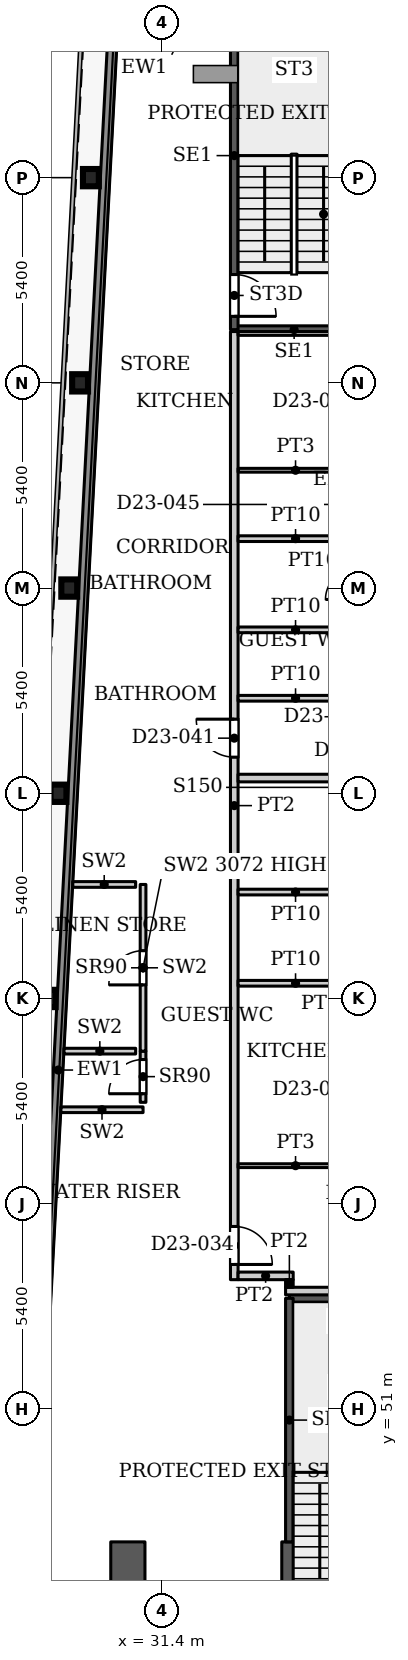
"""IFC4 building model, lengths in metres.
Left out: names, types, materials, properties, quantities, classifications, styles, units other than length and angle.
Written with IfcOpenShell. Run it as: python <this file> out.ifc"""

import sys

from ifc_helpers import new_model, si_unit, direction, frame, frame_2d, origin, origin_2d, place, context, subcontext, project, spatial, rectangle, i_section, extrude, source, transform, mapped, element, fill, save


model = new_model("IFC4")
c1 = context("Model", 3, precision=1e-05, world=origin(), true_north=direction((0.0, 1.0)))
c2 = subcontext(c1, "Body", "Model", "MODEL_VIEW")
j1 = project(units=[si_unit("LENGTHUNIT", "METRE"), si_unit("PLANEANGLEUNIT", "RADIAN")], contexts=[c1])
p1 = place(None, origin())
s1 = spatial("IfcSite", under=j1, at=p1, CompositionType="ELEMENT")
p2 = place(p1, origin())
s2 = spatial("IfcBuilding", under=s1, at=p2, CompositionType="ELEMENT")
p3 = place(p2, frame((0.0, 0.0, 101.9)))
s3 = spatial("IfcBuildingStorey", under=s2, at=p3, CompositionType="ELEMENT", Elevation=101.9)
for number, where, z_axis, x_axis in (
    (1, (28.39, 61.8, 0.0), (0.0, 0.0, 1.0), (1.0, 0.0, 0.0)),
    (2, (28.674, 67.2, 0.0), (0.0, 0.0, 1.0), (1.0, 0.0, 0.0)),
    (3, (28.958, 72.6, 0.0), (0.0, 0.0, 1.0), (1.0, 0.0, 0.0)),
    (4, (29.243, 78.0, 0.0), (0.0, 0.0, 1.0), (1.0, 0.0, 0.0)),
    (5, (29.527, 83.4, 0.0), (0.0, 0.0, 1.0), (1.0, 0.0, 0.0)),
):
    element("IfcColumn", number, at=place(p3, frame(where, z_axis=z_axis, x_axis=x_axis)), inside=s3, PredefinedType="COLUMN", context=c2, shape_type="SweptSolid", body=[
        extrude(i_section(OverallWidth=0.418, OverallDepth=0.455, WebThickness=0.042, FlangeThickness=0.068, FilletRadius=0.014, at=origin_2d()), origin(), (0.0, 0.0, 1.0), 3.9),
    ])
p4 = place(p3, frame((34.75, 29.05, 0.0), z_axis=(0.0, 0.0, 1.0), x_axis=(0.0, 1.0, 0.0)))
e6 = element("IfcWall", 6, at=p4, inside=s3, PredefinedType="SHEAR", context=c2, shape_type="SweptSolid", body=[
    extrude(rectangle(XDim=18.45, YDim=0.4, at=frame_2d((9.225, 0.0))), origin(), (0.0, 0.0, 1.0), 3.9),
])
p5 = place(p4, frame((8.025, 0.0, 0.0)))
e7 = element("IfcOpeningElement", 7, at=p5, cuts=e6, PredefinedType="OPENING", context=c2, shape_type="SweptSolid", body=[
    extrude(rectangle(XDim=1.1, YDim=2.2, at=frame_2d((0.55, 1.1))), frame((0.0, 0.21, 0.0), z_axis=(0.0, -1.0, 0.0), x_axis=(1.0, 0.0, 0.0)), (0.0, 0.0, 1.0), 0.42),
])
p6 = place(p4, frame((10.875, 0.0, 0.0)))
e8 = element("IfcOpeningElement", 8, at=p6, cuts=e6, PredefinedType="OPENING", context=c2, shape_type="SweptSolid", body=[
    extrude(rectangle(XDim=1.1, YDim=2.2, at=frame_2d((0.55, 1.1))), frame((0.0, 0.21, 0.0), z_axis=(0.0, -1.0, 0.0), x_axis=(1.0, 0.0, 0.0)), (0.0, 0.0, 1.0), 0.42),
])
p7 = place(p4, frame((13.725, 0.0, 0.0)))
e9 = element("IfcOpeningElement", 9, at=p7, cuts=e6, PredefinedType="OPENING", context=c2, shape_type="SweptSolid", body=[
    extrude(rectangle(XDim=1.1, YDim=2.2, at=frame_2d((0.55, 1.1))), frame((0.0, 0.21, 0.0), z_axis=(0.0, -1.0, 0.0), x_axis=(1.0, 0.0, 0.0)), (0.0, 0.0, 1.0), 0.42),
])
p8 = place(p4, frame((15.95, 0.0, 0.0)))
e10 = element("IfcOpeningElement", 10, at=p8, cuts=e6, PredefinedType="OPENING", context=c2, shape_type="SweptSolid", body=[
    extrude(rectangle(XDim=1.1, YDim=2.2, at=frame_2d((0.55, 1.1))), frame((0.0, 0.21, 0.0), z_axis=(0.0, -1.0, 0.0), x_axis=(1.0, 0.0, 0.0)), (0.0, 0.0, 1.0), 0.42),
])
p9 = place(p3, frame((30.5, 29.05, 0.0), z_axis=(0.0, 0.0, 1.0), x_axis=(0.0, 1.0, 0.0)))
e11 = element("IfcWall", 11, at=p9, inside=s3, PredefinedType="SHEAR", context=c2, shape_type="SweptSolid", body=[
    extrude(rectangle(XDim=18.45, YDim=0.9, at=frame_2d((9.225, 0.0))), origin(), (0.0, 0.0, 1.0), 3.9),
])
p10 = place(p9, frame((1.5, 0.0, 0.0)))
e12 = element("IfcOpeningElement", 12, at=p10, cuts=e11, PredefinedType="OPENING", context=c2, shape_type="SweptSolid", body=[
    extrude(rectangle(XDim=0.9, YDim=2.2, at=frame_2d((0.45, 1.1))), frame((0.0, 0.46, 0.0), z_axis=(0.0, -1.0, 0.0), x_axis=(1.0, 0.0, 0.0)), (0.0, 0.0, 1.0), 0.92),
])
p11 = place(p9, frame((6.03, 0.0, 0.0)))
e13 = element("IfcOpeningElement", 13, at=p11, cuts=e11, PredefinedType="OPENING", context=c2, shape_type="SweptSolid", body=[
    extrude(rectangle(XDim=0.9, YDim=2.2, at=frame_2d((0.45, 1.1))), frame((0.0, 0.46, 0.0), z_axis=(0.0, -1.0, 0.0), x_axis=(1.0, 0.0, 0.0)), (0.0, 0.0, 1.0), 0.92),
])
p12 = place(p9, frame((9.7, 0.0, 0.0)))
e14 = element("IfcOpeningElement", 14, at=p12, cuts=e11, PredefinedType="OPENING", context=c2, shape_type="SweptSolid", body=[
    extrude(rectangle(XDim=0.9, YDim=2.2, at=frame_2d((0.45, 1.1))), frame((0.0, 0.46, 0.0), z_axis=(0.0, -1.0, 0.0), x_axis=(1.0, 0.0, 0.0)), (0.0, 0.0, 1.0), 0.92),
])
p13 = place(p3, frame((27.195, 31.969, 0.0), z_axis=(0.0, 0.0, 1.0), x_axis=(0.052559748861, 0.998617781135, 0.0)))
e15 = element("IfcWall", 15, at=p13, inside=s3, PredefinedType="SOLIDWALL", context=c2, shape_type="SweptSolid", body=[
    extrude(rectangle(XDim=55.972, YDim=0.25, at=frame_2d((27.986, 0.0))), origin(), (0.0, 0.0, 1.0), 3.75),
])
p14 = place(p3, frame((34.75, 53.91, 0.0), z_axis=(0.0, 0.0, 1.0), x_axis=(1.0, 0.0, 0.0)))
e16 = element("IfcWall", 16, at=p14, inside=s3, PredefinedType="SHEAR", context=c2, shape_type="SweptSolid", body=[
    extrude(rectangle(XDim=3.15, YDim=0.2, at=frame_2d((1.575, 0.0))), origin(), (0.0, 0.0, 1.0), 3.9),
])
p15 = place(p3, frame((34.75, 47.5, 0.0), z_axis=(0.0, 0.0, 1.0), x_axis=(0.0, 1.0, 0.0)))
e17 = element("IfcWall", 17, at=p15, inside=s3, PredefinedType="SHEAR", context=c2, shape_type="SweptSolid", body=[
    extrude(rectangle(XDim=6.41, YDim=0.2, at=frame_2d((3.205, 0.0))), origin(), (0.0, 0.0, 1.0), 3.9),
])
p16 = place(p3, frame((33.3, 79.4, 0.0), z_axis=(0.0, 0.0, 1.0), x_axis=(1.0, 0.0, 0.0)))
e18 = element("IfcWall", 18, at=p16, inside=s3, PredefinedType="SHEAR", context=c2, shape_type="SweptSolid", body=[
    extrude(rectangle(XDim=3.15, YDim=0.2, at=frame_2d((1.575, 0.0))), origin(), (0.0, 0.0, 1.0), 3.9),
])
p17 = place(p3, frame((33.3, 79.4, 0.0), z_axis=(0.0, 0.0, 1.0), x_axis=(0.0, 1.0, 0.0)))
e19 = element("IfcWall", 19, at=p17, inside=s3, PredefinedType="SHEAR", context=c2, shape_type="SweptSolid", body=[
    extrude(rectangle(XDim=9.16, YDim=0.2, at=frame_2d((4.58, 0.0))), origin(), (0.0, 0.0, 1.0), 3.9),
])
p18 = place(p17, frame((0.35, 0.0, 0.0)))
e20 = element("IfcOpeningElement", 20, at=p18, cuts=e19, PredefinedType="OPENING", context=c2, shape_type="SweptSolid", body=[
    extrude(rectangle(XDim=1.1, YDim=2.2, at=frame_2d((0.55, 1.1))), frame((0.0, 0.11, 0.0), z_axis=(0.0, -1.0, 0.0), x_axis=(1.0, 0.0, 0.0)), (0.0, 0.0, 1.0), 0.22),
])
p19 = place(p3, frame((28.739, 58.872, 0.0), z_axis=(0.0, 0.0, 1.0), x_axis=(1.0, 0.0, 0.0)))
e21 = element("IfcWall", 21, at=p19, inside=s3, PredefinedType="PARTITIONING", context=c2, shape_type="SweptSolid", body=[
    extrude(rectangle(XDim=2.161, YDim=0.15, at=frame_2d((1.081, 0.0))), origin(), (0.0, 0.0, 1.0), 3.9),
])
p20 = place(p3, frame((30.9, 59.067, 0.0), z_axis=(0.0, 0.0, 1.0), x_axis=(0.0, 1.0, 0.0)))
e22 = element("IfcWall", 22, at=p20, inside=s3, PredefinedType="PARTITIONING", context=c2, shape_type="SweptSolid", body=[
    extrude(rectangle(XDim=1.347, YDim=0.15, at=frame_2d((0.674, 0.0))), origin(), (0.0, 0.0, 1.0), 3.9),
])
p21 = place(p20, frame((0.226, 0.0, 0.0)))
e23 = element("IfcOpeningElement", 23, at=p21, cuts=e22, PredefinedType="OPENING", context=c2, shape_type="SweptSolid", body=[
    extrude(rectangle(XDim=0.9, YDim=2.2, at=frame_2d((0.45, 1.1))), frame((0.0, 0.085, 0.0), z_axis=(0.0, -1.0, 0.0), x_axis=(1.0, 0.0, 0.0)), (0.0, 0.0, 1.0), 0.17),
])
p22 = place(p3, frame((28.82, 60.414, 0.0), z_axis=(0.0, 0.0, 1.0), x_axis=(1.0, 0.0, 0.0)))
e24 = element("IfcWall", 24, at=p22, inside=s3, PredefinedType="PARTITIONING", context=c2, shape_type="SweptSolid", body=[
    extrude(rectangle(XDim=1.885, YDim=0.15, at=frame_2d((0.942, 0.0))), origin(), (0.0, 0.0, 1.0), 3.9),
])
p23 = place(p3, frame((30.9, 60.414, 0.0), z_axis=(0.0, 0.0, 1.0), x_axis=(0.0, 1.0, 0.0)))
e25 = element("IfcWall", 25, at=p23, inside=s3, PredefinedType="PARTITIONING", context=c2, shape_type="SweptSolid", body=[
    extrude(rectangle(XDim=4.386, YDim=0.15, at=frame_2d((2.193, 0.0))), origin(), (0.0, 0.0, 1.0), 3.072),
])
p24 = place(p23, frame((1.743, 0.0, 0.0)))
e26 = element("IfcOpeningElement", 26, at=p24, cuts=e25, PredefinedType="OPENING", context=c2, shape_type="SweptSolid", body=[
    extrude(rectangle(XDim=0.9, YDim=2.2, at=frame_2d((0.45, 1.1))), frame((0.0, 0.085, 0.0), z_axis=(0.0, -1.0, 0.0), x_axis=(1.0, 0.0, 0.0)), (0.0, 0.0, 1.0), 0.17),
])
p25 = place(p3, frame((29.051, 64.8, 0.0), z_axis=(0.0, 0.0, 1.0), x_axis=(1.0, 0.0, 0.0)))
e27 = element("IfcWall", 27, at=p25, inside=s3, PredefinedType="PARTITIONING", context=c2, shape_type="SweptSolid", body=[
    extrude(rectangle(XDim=1.654, YDim=0.15, at=frame_2d((0.827, 0.0))), origin(), (0.0, 0.0, 1.0), 3.9),
])
p26 = place(p3, frame((33.3, 54.4, 0.0), z_axis=(0.0, 0.0, 1.0), x_axis=(0.0, 1.0, 0.0)))
e28 = element("IfcWall", 28, at=p26, inside=s3, PredefinedType="PARTITIONING", context=c2, shape_type="SweptSolid", body=[
    extrude(rectangle(XDim=24.95, YDim=0.2, at=frame_2d((12.475, 0.0))), origin(), (0.0, 0.0, 1.0), 3.6),
])
p27 = place(p26, frame((0.4, 0.0, 0.0)))
e29 = element("IfcOpeningElement", 29, at=p27, cuts=e28, PredefinedType="OPENING", context=c2, shape_type="SweptSolid", body=[
    extrude(rectangle(XDim=1.0, YDim=2.1, at=frame_2d((0.5, 1.05))), frame((0.0, 0.11, 0.0), z_axis=(0.0, -1.0, 0.0), x_axis=(1.0, 0.0, 0.0)), (0.0, 0.0, 1.0), 0.22),
])
p28 = place(p26, frame((13.75, 0.0, 0.0)))
e30 = element("IfcOpeningElement", 30, at=p28, cuts=e28, PredefinedType="OPENING", context=c2, shape_type="SweptSolid", body=[
    extrude(rectangle(XDim=1.0, YDim=2.1, at=frame_2d((0.5, 1.05))), frame((0.0, 0.11, 0.0), z_axis=(0.0, -1.0, 0.0), x_axis=(1.0, 0.0, 0.0)), (0.0, 0.0, 1.0), 0.22),
])
p29 = place(p3, frame((33.4, 54.5, 0.0), z_axis=(0.0, 0.0, 1.0), x_axis=(1.0, 0.0, 0.0)))
e31 = element("IfcWall", 31, at=p29, inside=s3, PredefinedType="PARTITIONING", context=c2, shape_type="SweptSolid", body=[
    extrude(rectangle(XDim=1.45, YDim=0.2, at=frame_2d((0.725, 0.0))), origin(), (0.0, 0.0, 1.0), 3.6),
])
p30 = place(p3, frame((33.4, 57.4, 0.0), z_axis=(0.0, 0.0, 1.0), x_axis=(1.0, 0.0, 0.0)))
e32 = element("IfcWall", 32, at=p30, inside=s3, PredefinedType="PARTITIONING", context=c2, shape_type="SweptSolid", body=[
    extrude(rectangle(XDim=3.025, YDim=0.1, at=frame_2d((1.513, 0.0))), origin(), (0.0, 0.0, 1.0), 3.6),
])
for number, where, z_axis, x_axis in (
    (33, (33.4, 62.2, 0.0), (0.0, 0.0, 1.0), (1.0, 0.0, 0.0)),
    (34, (33.4, 64.6, 0.0), (0.0, 0.0, 1.0), (1.0, 0.0, 0.0)),
):
    element("IfcWall", number, at=place(p3, frame(where, z_axis=z_axis, x_axis=x_axis)), inside=s3, PredefinedType="PARTITIONING", context=c2, shape_type="SweptSolid", body=[
        extrude(rectangle(XDim=3.025, YDim=0.15, at=frame_2d((1.513, 0.0))), origin(), (0.0, 0.0, 1.0), 3.6),
    ])
p31 = place(p3, frame((33.4, 67.6, 0.0), z_axis=(0.0, 0.0, 1.0), x_axis=(1.0, 0.0, 0.0)))
e35 = element("IfcWall", 35, at=p31, inside=s3, PredefinedType="PARTITIONING", context=c2, shape_type="SweptSolid", body=[
    extrude(rectangle(XDim=12.5, YDim=0.2, at=frame_2d((6.25, 0.0))), origin(), (0.0, 0.0, 1.0), 3.6),
])
for number, where, z_axis, x_axis in (
    (36, (33.4, 69.7, 0.0), (0.0, 0.0, 1.0), (1.0, 0.0, 0.0)),
    (37, (33.4, 71.5, 0.0), (0.0, 0.0, 1.0), (1.0, 0.0, 0.0)),
    (38, (33.4, 73.9, 0.0), (0.0, 0.0, 1.0), (1.0, 0.0, 0.0)),
):
    element("IfcWall", number, at=place(p3, frame(where, z_axis=z_axis, x_axis=x_axis)), inside=s3, PredefinedType="PARTITIONING", context=c2, shape_type="SweptSolid", body=[
        extrude(rectangle(XDim=3.025, YDim=0.15, at=frame_2d((1.513, 0.0))), origin(), (0.0, 0.0, 1.0), 3.6),
    ])
p32 = place(p3, frame((33.4, 75.7, 0.0), z_axis=(0.0, 0.0, 1.0), x_axis=(1.0, 0.0, 0.0)))
e39 = element("IfcWall", 39, at=p32, inside=s3, PredefinedType="PARTITIONING", context=c2, shape_type="SweptSolid", body=[
    extrude(rectangle(XDim=3.025, YDim=0.1, at=frame_2d((1.513, 0.0))), origin(), (0.0, 0.0, 1.0), 3.6),
])
p33 = place(p3, frame((33.4, 79.3, 0.0), z_axis=(0.0, 0.0, 1.0), x_axis=(1.0, 0.0, 0.0)))
e40 = element("IfcWall", 40, at=p33, inside=s3, PredefinedType="PARTITIONING", context=c2, shape_type="SweptSolid", body=[
    extrude(rectangle(XDim=12.5, YDim=0.1, at=frame_2d((6.25, 0.0))), origin(), (0.0, 0.0, 1.0), 3.6),
])
p34 = place(p33, frame((3.355, 0.0, 0.0)))
e41 = element("IfcOpeningElement", 41, at=p34, cuts=e40, PredefinedType="OPENING", context=c2, shape_type="SweptSolid", body=[
    extrude(rectangle(XDim=0.9, YDim=2.1, at=frame_2d((0.45, 1.05))), frame((0.0, 0.06, 0.0), z_axis=(0.0, -1.0, 0.0), x_axis=(1.0, 0.0, 0.0)), (0.0, 0.0, 1.0), 0.12),
])
p35 = place(p3, frame((34.65, 54.1, 0.0), z_axis=(0.0, 0.0, 1.0), x_axis=(1.0, 0.0, 0.0)))
e42 = element("IfcWall", 42, at=p35, inside=s3, PredefinedType="PARTITIONING", context=c2, shape_type="SweptSolid", body=[
    extrude(rectangle(XDim=11.25, YDim=0.2, at=frame_2d((5.625, 0.0))), origin(), (0.0, 0.0, 1.0), 3.6),
])
p36 = place(p3, frame((34.75, 54.2, 0.0), z_axis=(0.0, 0.0, 1.0), x_axis=(0.0, 1.0, 0.0)))
e43 = element("IfcWall", 43, at=p36, inside=s3, PredefinedType="PARTITIONING", context=c2, shape_type="SweptSolid", body=[
    extrude(rectangle(XDim=0.2, YDim=0.2, at=frame_2d((0.1, 0.0))), origin(), (0.0, 0.0, 1.0), 3.6),
])
m1 = source(origin(), c2, "Body", "SweptSolid", [
    extrude(rectangle(XDim=0.9, YDim=2.2, at=frame_2d((0.45, 1.1))), frame((0.0, 0.025, 0.0), z_axis=(0.0, -1.0, 0.0), x_axis=(1.0, 0.0, 0.0)), (0.0, 0.0, 1.0), 0.05),
])
p37 = place(p21, origin())
e44 = element("IfcDoor", 44, at=p37, inside=s3, OperationType="SINGLE_SWING_LEFT", PredefinedType="DOOR", context=c2, shape_type="MappedRepresentation", body=[
    mapped(m1, transform((0.0, 0.0, 0.0), x_axis=(1.0, 0.0, 0.0), y_axis=(0.0, 1.0, 0.0), z_axis=(0.0, 0.0, 1.0), scale=1.0)),
])
fill(e23, e44)
p38 = place(p24, origin())
e45 = element("IfcDoor", 45, at=p38, inside=s3, OperationType="SINGLE_SWING_LEFT", PredefinedType="DOOR", context=c2, shape_type="MappedRepresentation", body=[
    mapped(m1, transform((0.0, 0.0, 0.0), x_axis=(1.0, 0.0, 0.0), y_axis=(0.0, 1.0, 0.0), z_axis=(0.0, 0.0, 1.0), scale=1.0)),
])
fill(e26, e45)
m2 = source(origin(), c2, "Body", "SweptSolid", [
    extrude(rectangle(XDim=1.1, YDim=2.2, at=frame_2d((0.55, 1.1))), frame((0.0, 0.025, 0.0), z_axis=(0.0, -1.0, 0.0), x_axis=(1.0, 0.0, 0.0)), (0.0, 0.0, 1.0), 0.05),
])
p39 = place(p18, origin())
e46 = element("IfcDoor", 46, at=p39, inside=s3, OperationType="SINGLE_SWING_RIGHT", PredefinedType="DOOR", context=c2, shape_type="MappedRepresentation", body=[
    mapped(m2, transform((0.0, 0.0, 0.0), x_axis=(1.0, 0.0, 0.0), y_axis=(0.0, 1.0, 0.0), z_axis=(0.0, 0.0, 1.0), scale=1.0)),
])
fill(e20, e46)
m3 = source(origin(), c2, "Body", "SweptSolid", [
    extrude(rectangle(XDim=1.0, YDim=2.1, at=frame_2d((0.5, 1.05))), frame((0.0, 0.025, 0.0), z_axis=(0.0, -1.0, 0.0), x_axis=(1.0, 0.0, 0.0)), (0.0, 0.0, 1.0), 0.05),
])
p40 = place(p27, origin())
e47 = element("IfcDoor", 47, at=p40, inside=s3, OperationType="SINGLE_SWING_RIGHT", PredefinedType="DOOR", context=c2, shape_type="MappedRepresentation", body=[
    mapped(m3, transform((0.0, 0.0, 0.0), x_axis=(1.0, 0.0, 0.0), y_axis=(0.0, 1.0, 0.0), z_axis=(0.0, 0.0, 1.0), scale=1.0)),
])
fill(e29, e47)
p41 = place(p28, origin())
e48 = element("IfcDoor", 48, at=p41, inside=s3, OperationType="SINGLE_SWING_LEFT", PredefinedType="DOOR", context=c2, shape_type="MappedRepresentation", body=[
    mapped(m3, transform((0.0, 0.0, 0.0), x_axis=(1.0, 0.0, 0.0), y_axis=(0.0, 1.0, 0.0), z_axis=(0.0, 0.0, 1.0), scale=1.0)),
])
fill(e30, e48)
save(model, sys.argv[1])
